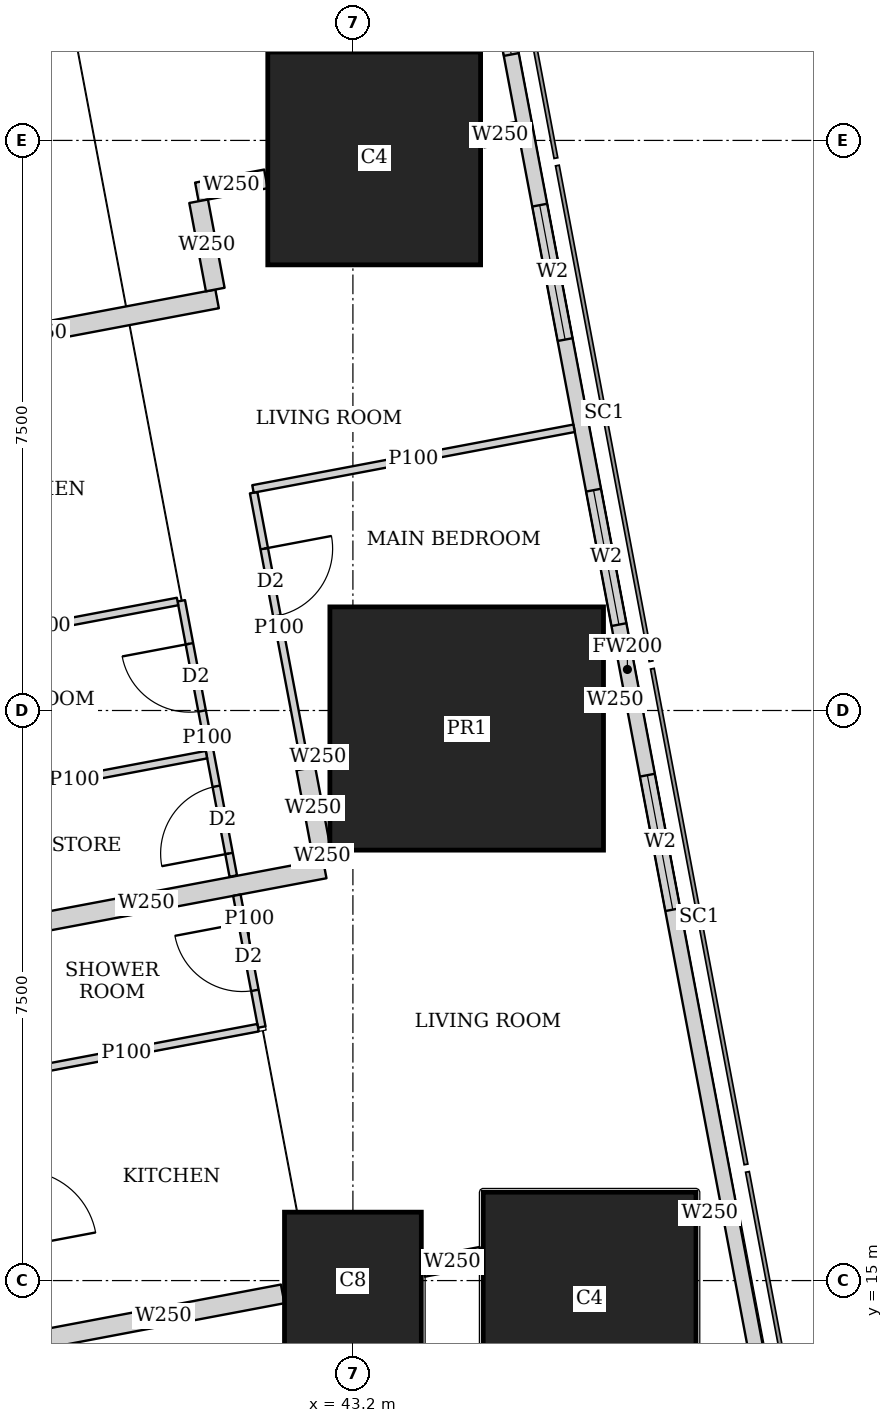
"""IFC4 building model, lengths in metres.
Left out: names, types, materials, properties, quantities, classifications, styles, units other than length and angle.
Written with IfcOpenShell. Run it as: python <this file> out.ifc"""

import sys

from ifc_helpers import new_model, si_unit, direction, frame, frame_2d, origin, origin_2d, place, context, subcontext, project, spatial, rectangle, extrude, element, fill, save


model = new_model("IFC4")
c1 = context("Model", 3, precision=1e-05, world=origin(), true_north=direction((0.0, 1.0)))
c2 = subcontext(c1, "Body", "Model", "MODEL_VIEW")
j1 = project(units=[si_unit("LENGTHUNIT", "METRE"), si_unit("PLANEANGLEUNIT", "RADIAN")], contexts=[c1])
p1 = place(None, origin())
s1 = spatial("IfcSite", under=j1, at=p1, CompositionType="ELEMENT")
p2 = place(p1, origin())
s2 = spatial("IfcBuilding", under=s1, at=p2, CompositionType="ELEMENT")
p3 = place(p2, frame((0.0, 0.0, 68.75)))
s3 = spatial("IfcBuildingStorey", under=s2, at=p3, CompositionType="ELEMENT", Elevation=68.75)
p4 = place(p3, frame((43.2, 15.0, 0.0), z_axis=(0.0, 0.0, 1.0), x_axis=(1.0, 0.0, 0.0)))
e1 = element("IfcColumn", 1, at=p4, inside=s3, PredefinedType="COLUMN", context=c2, shape_type="SweptSolid", body=[
    extrude(rectangle(XDim=1.8, YDim=1.8, at=origin_2d()), origin(), (0.0, 0.0, 1.0), 3.75),
])
p5 = place(p3, frame((46.314, 14.763, 0.0), z_axis=(0.0, 0.0, 1.0), x_axis=(1.0, 0.0, 0.0)))
e2 = element("IfcColumn", 2, at=p5, inside=s3, PredefinedType="COLUMN", context=c2, shape_type="SweptSolid", body=[
    extrude(rectangle(XDim=2.8, YDim=2.8, at=origin_2d()), origin(), (0.0, 0.0, 1.0), 3.75),
])
p6 = place(p3, frame((44.697, 22.263, 0.0), z_axis=(0.0, 0.0, 1.0), x_axis=(1.0, 0.0, 0.0)))
e3 = element("IfcColumn", 3, at=p6, inside=s3, PredefinedType="COLUMN", context=c2, shape_type="SweptSolid", body=[
    extrude(rectangle(XDim=3.6, YDim=3.2, at=origin_2d()), origin(), (0.0, 0.0, 1.0), 3.75),
])
p7 = place(p3, frame((43.48, 29.763, 0.0), z_axis=(0.0, 0.0, 1.0), x_axis=(1.0, 0.0, 0.0)))
e4 = element("IfcColumn", 4, at=p7, inside=s3, PredefinedType="COLUMN", context=c2, shape_type="SweptSolid", body=[
    extrude(rectangle(XDim=2.8, YDim=2.8, at=origin_2d()), origin(), (0.0, 0.0, 1.0), 3.75),
])
p8 = place(p3, frame((50.653, 2.703, 0.0), z_axis=(0.0, 0.0, 1.0), x_axis=(-0.185612026696, 0.982623109613, 0.0)))
e5 = element("IfcWall", 5, at=p8, inside=s3, PredefinedType="SOLIDWALL", context=c2, shape_type="SweptSolid", body=[
    extrude(rectangle(XDim=41.393, YDim=0.2, at=frame_2d((20.697, 0.0))), origin(), (0.0, 0.0, 1.0), 3.45),
])
p9 = place(p8, frame((1.633, 0.0, 0.9)))
e6 = element("IfcOpeningElement", 6, at=p9, cuts=e5, PredefinedType="OPENING", context=c2, shape_type="SweptSolid", body=[
    extrude(rectangle(XDim=1.8, YDim=1.5, at=frame_2d((0.9, 0.75))), frame((0.0, 0.11, 0.0), z_axis=(0.0, -1.0, 0.0), x_axis=(1.0, 0.0, 0.0)), (0.0, 0.0, 1.0), 0.22),
])
p10 = place(p8, frame((6.032, 0.0, 0.9)))
e7 = element("IfcOpeningElement", 7, at=p10, cuts=e5, PredefinedType="OPENING", context=c2, shape_type="SweptSolid", body=[
    extrude(rectangle(XDim=1.8, YDim=1.5, at=frame_2d((0.9, 0.75))), frame((0.0, 0.11, 0.0), z_axis=(0.0, -1.0, 0.0), x_axis=(1.0, 0.0, 0.0)), (0.0, 0.0, 1.0), 0.22),
])
p11 = place(p8, frame((9.848, 0.0, 0.9)))
e8 = element("IfcOpeningElement", 8, at=p11, cuts=e5, PredefinedType="OPENING", context=c2, shape_type="SweptSolid", body=[
    extrude(rectangle(XDim=1.8, YDim=1.5, at=frame_2d((0.9, 0.75))), frame((0.0, 0.11, 0.0), z_axis=(0.0, -1.0, 0.0), x_axis=(1.0, 0.0, 0.0)), (0.0, 0.0, 1.0), 0.22),
])
p12 = place(p8, frame((17.481, 0.0, 0.9)))
e9 = element("IfcOpeningElement", 9, at=p12, cuts=e5, PredefinedType="OPENING", context=c2, shape_type="SweptSolid", body=[
    extrude(rectangle(XDim=1.8, YDim=1.5, at=frame_2d((0.9, 0.75))), frame((0.0, 0.11, 0.0), z_axis=(0.0, -1.0, 0.0), x_axis=(1.0, 0.0, 0.0)), (0.0, 0.0, 1.0), 0.22),
])
p13 = place(p8, frame((21.297, 0.0, 0.9)))
e10 = element("IfcOpeningElement", 10, at=p13, cuts=e5, PredefinedType="OPENING", context=c2, shape_type="SweptSolid", body=[
    extrude(rectangle(XDim=1.8, YDim=1.5, at=frame_2d((0.9, 0.75))), frame((0.0, 0.11, 0.0), z_axis=(0.0, -1.0, 0.0), x_axis=(1.0, 0.0, 0.0)), (0.0, 0.0, 1.0), 0.22),
])
p14 = place(p8, frame((25.113, 0.0, 0.9)))
e11 = element("IfcOpeningElement", 11, at=p14, cuts=e5, PredefinedType="OPENING", context=c2, shape_type="SweptSolid", body=[
    extrude(rectangle(XDim=1.8, YDim=1.5, at=frame_2d((0.9, 0.75))), frame((0.0, 0.11, 0.0), z_axis=(0.0, -1.0, 0.0), x_axis=(1.0, 0.0, 0.0)), (0.0, 0.0, 1.0), 0.22),
])
p15 = place(p8, frame((28.93, 0.0, 0.9)))
e12 = element("IfcOpeningElement", 12, at=p15, cuts=e5, PredefinedType="OPENING", context=c2, shape_type="SweptSolid", body=[
    extrude(rectangle(XDim=1.8, YDim=1.5, at=frame_2d((0.9, 0.75))), frame((0.0, 0.11, 0.0), z_axis=(0.0, -1.0, 0.0), x_axis=(1.0, 0.0, 0.0)), (0.0, 0.0, 1.0), 0.22),
])
p16 = place(p8, frame((32.746, 0.0, 0.9)))
e13 = element("IfcOpeningElement", 13, at=p16, cuts=e5, PredefinedType="OPENING", context=c2, shape_type="SweptSolid", body=[
    extrude(rectangle(XDim=1.8, YDim=1.5, at=frame_2d((0.9, 0.75))), frame((0.0, 0.11, 0.0), z_axis=(0.0, -1.0, 0.0), x_axis=(1.0, 0.0, 0.0)), (0.0, 0.0, 1.0), 0.22),
])
p17 = place(p8, frame((36.481, 0.0, 0.9)))
e14 = element("IfcOpeningElement", 14, at=p17, cuts=e5, PredefinedType="OPENING", context=c2, shape_type="SweptSolid", body=[
    extrude(rectangle(XDim=1.8, YDim=1.5, at=frame_2d((0.9, 0.75))), frame((0.0, 0.11, 0.0), z_axis=(0.0, -1.0, 0.0), x_axis=(1.0, 0.0, 0.0)), (0.0, 0.0, 1.0), 0.22),
])
p18 = place(p3, frame((33.68, 42.723, 0.0), z_axis=(0.0, 0.0, 1.0), x_axis=(0.185624129307, -0.98262082342, 0.0)))
e15 = element("IfcWall", 15, at=p18, inside=s3, PredefinedType="SOLIDWALL", context=c2, shape_type="SweptSolid", body=[
    extrude(rectangle(XDim=41.051, YDim=0.15, at=frame_2d((20.526, 0.0))), origin(), (0.0, 0.0, 1.0), 2.45),
])
p19 = place(p18, frame((13.577, 0.0, 0.0)))
e16 = element("IfcOpeningElement", 16, at=p19, cuts=e15, PredefinedType="OPENING", context=c2, shape_type="SweptSolid", body=[
    extrude(rectangle(XDim=1.0, YDim=2.1, at=frame_2d((0.5, 1.05))), frame((0.0, 0.085, 0.0), z_axis=(0.0, -1.0, 0.0), x_axis=(1.0, 0.0, 0.0)), (0.0, 0.0, 1.0), 0.17),
])
p20 = place(p18, frame((17.394, 0.0, 0.0)))
e17 = element("IfcOpeningElement", 17, at=p20, cuts=e15, PredefinedType="OPENING", context=c2, shape_type="SweptSolid", body=[
    extrude(rectangle(XDim=1.0, YDim=2.1, at=frame_2d((0.5, 1.05))), frame((0.0, 0.085, 0.0), z_axis=(0.0, -1.0, 0.0), x_axis=(1.0, 0.0, 0.0)), (0.0, 0.0, 1.0), 0.17),
])
p21 = place(p18, frame((26.758, 0.0, 0.0)))
e18 = element("IfcOpeningElement", 18, at=p21, cuts=e15, PredefinedType="OPENING", context=c2, shape_type="SweptSolid", body=[
    extrude(rectangle(XDim=1.0, YDim=2.1, at=frame_2d((0.5, 1.05))), frame((0.0, 0.085, 0.0), z_axis=(0.0, -1.0, 0.0), x_axis=(1.0, 0.0, 0.0)), (0.0, 0.0, 1.0), 0.17),
])
p22 = place(p18, frame((32.193, 0.0, 0.0)))
e19 = element("IfcOpeningElement", 19, at=p22, cuts=e15, PredefinedType="OPENING", context=c2, shape_type="SweptSolid", body=[
    extrude(rectangle(XDim=1.0, YDim=2.1, at=frame_2d((0.5, 1.05))), frame((0.0, 0.085, 0.0), z_axis=(0.0, -1.0, 0.0), x_axis=(1.0, 0.0, 0.0)), (0.0, 0.0, 1.0), 0.17),
])
p23 = place(p3, frame((39.525, 31.443, 0.0), z_axis=(0.0, 0.0, 1.0), x_axis=(-0.982648035033, -0.185480023848, 0.0)))
e20 = element("IfcWall", 20, at=p23, inside=s3, PredefinedType="PARTITIONING", context=c2, shape_type="SweptSolid", body=[
    extrude(rectangle(XDim=3.575, YDim=0.1, at=frame_2d((1.788, 0.0))), origin(), (0.0, 0.0, 1.0), 3.45),
])
p24 = place(p3, frame((41.894, 25.366, 0.0), z_axis=(0.0, 0.0, 1.0), x_axis=(0.185611839851, -0.982623144907, 0.0)))
e21 = element("IfcWall", 21, at=p24, inside=s3, PredefinedType="PARTITIONING", context=c2, shape_type="SweptSolid", body=[
    extrude(rectangle(XDim=3.62, YDim=0.1, at=frame_2d((1.81, 0.0))), origin(), (0.0, 0.0, 1.0), 2.45),
])
p25 = place(p24, frame((0.75, 0.0, 0.0)))
e22 = element("IfcOpeningElement", 22, at=p25, cuts=e21, PredefinedType="OPENING", context=c2, shape_type="SweptSolid", body=[
    extrude(rectangle(XDim=0.9, YDim=2.1, at=frame_2d((0.45, 1.05))), frame((0.0, 0.06, 0.0), z_axis=(0.0, -1.0, 0.0), x_axis=(1.0, 0.0, 0.0)), (0.0, 0.0, 1.0), 0.12),
])
p26 = place(p3, frame((40.942, 23.943, 0.0), z_axis=(0.0, 0.0, 1.0), x_axis=(0.185632361754, -0.982619268216, 0.0)))
e23 = element("IfcWall", 23, at=p26, inside=s3, PredefinedType="PARTITIONING", context=c2, shape_type="SweptSolid", body=[
    extrude(rectangle(XDim=3.685, YDim=0.1, at=frame_2d((1.843, 0.0))), origin(), (0.0, 0.0, 1.0), 2.45),
])
p27 = place(p26, frame((0.575, 0.0, 0.0)))
e24 = element("IfcOpeningElement", 24, at=p27, cuts=e23, PredefinedType="OPENING", context=c2, shape_type="SweptSolid", body=[
    extrude(rectangle(XDim=0.9, YDim=2.1, at=frame_2d((0.45, 1.05))), frame((0.0, 0.06, 0.0), z_axis=(0.0, -1.0, 0.0), x_axis=(1.0, 0.0, 0.0)), (0.0, 0.0, 1.0), 0.12),
])
p28 = place(p26, frame((2.483, 0.0, 0.0)))
e25 = element("IfcOpeningElement", 25, at=p28, cuts=e23, PredefinedType="OPENING", context=c2, shape_type="SweptSolid", body=[
    extrude(rectangle(XDim=0.9, YDim=2.1, at=frame_2d((0.45, 1.05))), frame((0.0, 0.06, 0.0), z_axis=(0.0, -1.0, 0.0), x_axis=(1.0, 0.0, 0.0)), (0.0, 0.0, 1.0), 0.12),
])
p29 = place(p3, frame((46.11, 26.213, 0.0), z_axis=(0.0, 0.0, 1.0), x_axis=(-0.982633535512, -0.185556823879, 0.0)))
e26 = element("IfcWall", 26, at=p29, inside=s3, PredefinedType="PARTITIONING", context=c2, shape_type="SweptSolid", body=[
    extrude(rectangle(XDim=4.3, YDim=0.1, at=frame_2d((2.15, 0.0))), origin(), (0.0, 0.0, 1.0), 2.0),
])
p30 = place(p3, frame((40.893, 23.934, 0.0), z_axis=(0.0, 0.0, 1.0), x_axis=(-0.982588017646, -0.185797706064, 0.0)))
e27 = element("IfcWall", 27, at=p30, inside=s3, PredefinedType="PARTITIONING", context=c2, shape_type="SweptSolid", body=[
    extrude(rectangle(XDim=3.525, YDim=0.1, at=frame_2d((1.763, 0.0))), origin(), (0.0, 0.0, 1.0), 3.45),
])
p31 = place(p3, frame((41.273, 21.919, 0.0), z_axis=(0.0, 0.0, 1.0), x_axis=(-0.982636169624, -0.185542874149, 0.0)))
e28 = element("IfcWall", 28, at=p31, inside=s3, PredefinedType="PARTITIONING", context=c2, shape_type="SweptSolid", body=[
    extrude(rectangle(XDim=3.525, YDim=0.1, at=frame_2d((1.763, 0.0))), origin(), (0.0, 0.0, 1.0), 2.45),
])
p32 = place(p3, frame((45.372, 30.121, 0.0), z_axis=(0.0, 0.0, 1.0), x_axis=(-0.982352019699, -0.187041464366, 0.0)))
e29 = element("IfcWall", 29, at=p32, inside=s3, PredefinedType="SOLIDWALL", context=c2, shape_type="SweptSolid", body=[
    extrude(rectangle(XDim=0.476, YDim=0.25, at=frame_2d((0.238, 0.0))), origin(), (0.0, 0.0, 1.0), 3.45),
])
p33 = place(p3, frame((42.056, 29.494, 0.0), z_axis=(0.0, 0.0, 1.0), x_axis=(-0.982587178881, -0.185802141803, 0.0)))
e30 = element("IfcWall", 30, at=p33, inside=s3, PredefinedType="SOLIDWALL", context=c2, shape_type="SweptSolid", body=[
    extrude(rectangle(XDim=0.925, YDim=0.25, at=frame_2d((0.462, 0.0))), origin(), (0.0, 0.0, 1.0), 2.45),
])
p34 = place(p3, frame((41.413, 27.915, 0.0), z_axis=(0.0, 0.0, 1.0), x_axis=(-0.982635807605, -0.185544791394, 0.0)))
e31 = element("IfcWall", 31, at=p34, inside=s3, PredefinedType="SOLIDWALL", context=c2, shape_type="SweptSolid", body=[
    extrude(rectangle(XDim=4.775, YDim=0.25, at=frame_2d((2.388, 0.0))), origin(), (0.0, 0.0, 1.0), 3.45),
])
p35 = place(p3, frame((41.17, 29.2, 0.0), z_axis=(0.0, 0.0, 1.0), x_axis=(0.185223510709, -0.982696418575, 0.0)))
e32 = element("IfcWall", 32, at=p35, inside=s3, PredefinedType="SOLIDWALL", context=c2, shape_type="SweptSolid", body=[
    extrude(rectangle(XDim=1.182, YDim=0.25, at=frame_2d((0.591, 0.0))), origin(), (0.0, 0.0, 1.0), 2.45),
])
p36 = place(p3, frame((41.673, 20.07, 0.0), z_axis=(0.0, 0.0, 1.0), x_axis=(0.185783379659, -0.98259072652, 0.0)))
e33 = element("IfcWall", 33, at=p36, inside=s3, PredefinedType="PARTITIONING", context=c2, shape_type="SweptSolid", body=[
    extrude(rectangle(XDim=1.765, YDim=0.1, at=frame_2d((0.882, 0.0))), origin(), (0.0, 0.0, 1.0), 3.45),
])
p37 = place(p36, frame((0.374, 0.0, 0.0)))
e34 = element("IfcOpeningElement", 34, at=p37, cuts=e33, PredefinedType="OPENING", context=c2, shape_type="SweptSolid", body=[
    extrude(rectangle(XDim=0.9, YDim=2.1, at=frame_2d((0.45, 1.05))), frame((0.0, 0.06, 0.0), z_axis=(0.0, -1.0, 0.0), x_axis=(1.0, 0.0, 0.0)), (0.0, 0.0, 1.0), 0.12),
])
p38 = place(p3, frame((41.952, 18.327, 0.0), z_axis=(0.0, 0.0, 1.0), x_axis=(-0.982648794755, -0.185475998897, 0.0)))
e35 = element("IfcWall", 35, at=p38, inside=s3, PredefinedType="PARTITIONING", context=c2, shape_type="SweptSolid", body=[
    extrude(rectangle(XDim=3.525, YDim=0.1, at=frame_2d((1.763, 0.0))), origin(), (0.0, 0.0, 1.0), 3.45),
])
p39 = place(p3, frame((46.782, 22.657, 0.0), z_axis=(0.0, 0.0, 1.0), x_axis=(-0.982778390997, -0.18478807913, 0.0)))
e36 = element("IfcWall", 36, at=p39, inside=s3, PredefinedType="SOLIDWALL", context=c2, shape_type="SweptSolid", body=[
    extrude(rectangle(XDim=0.266, YDim=0.25, at=frame_2d((0.133, 0.0))), origin(), (0.0, 0.0, 1.0), 3.45),
])
p40 = place(p3, frame((42.873, 21.918, 0.0), z_axis=(0.0, 0.0, 1.0), x_axis=(-0.982892522967, -0.184180043152, 0.0)))
e37 = element("IfcWall", 37, at=p40, inside=s3, PredefinedType="SOLIDWALL", context=c2, shape_type="SweptSolid", body=[
    extrude(rectangle(XDim=0.272, YDim=0.25, at=frame_2d((0.136, 0.0))), origin(), (0.0, 0.0, 1.0), 2.45),
])
p41 = place(p3, frame((42.829, 20.416, 0.0), z_axis=(0.0, 0.0, 1.0), x_axis=(-0.982635807605, -0.185544791394, 0.0)))
e38 = element("IfcWall", 38, at=p41, inside=s3, PredefinedType="SOLIDWALL", context=c2, shape_type="SweptSolid", body=[
    extrude(rectangle(XDim=4.775, YDim=0.25, at=frame_2d((2.388, 0.0))), origin(), (0.0, 0.0, 1.0), 3.45),
])
p42 = place(p3, frame((42.58, 21.736, 0.0), z_axis=(0.0, 0.0, 1.0), x_axis=(0.185458925981, -0.982652017132, 0.0)))
e39 = element("IfcWall", 39, at=p42, inside=s3, PredefinedType="SOLIDWALL", context=c2, shape_type="SweptSolid", body=[
    extrude(rectangle(XDim=1.045, YDim=0.25, at=frame_2d((0.522, 0.0))), origin(), (0.0, 0.0, 1.0), 2.45),
])
p43 = place(p3, frame((42.787, 20.639, 0.0), z_axis=(0.0, 0.0, 1.0), x_axis=(0.185013851593, -0.982735913009, 0.0)))
e40 = element("IfcWall", 40, at=p43, inside=s3, PredefinedType="SOLIDWALL", context=c2, shape_type="SweptSolid", body=[
    extrude(rectangle(XDim=0.102, YDim=0.25, at=frame_2d((0.051, 0.0))), origin(), (0.0, 0.0, 1.0), 3.45),
])
p44 = place(p3, frame((48.055, 15.917, 0.0), z_axis=(0.0, 0.0, 1.0), x_axis=(-0.982510408223, -0.186207673669, 0.0)))
e41 = element("IfcWall", 41, at=p44, inside=s3, PredefinedType="SOLIDWALL", context=c2, shape_type="SweptSolid", body=[
    extrude(rectangle(XDim=0.323, YDim=0.25, at=frame_2d((0.161, 0.0))), origin(), (0.0, 0.0, 1.0), 3.45),
])
p45 = place(p3, frame((44.89, 15.319, 0.0), z_axis=(0.0, 0.0, 1.0), x_axis=(-0.982540856152, -0.186046945666, 0.0)))
e42 = element("IfcWall", 42, at=p45, inside=s3, PredefinedType="SOLIDWALL", context=c2, shape_type="SweptSolid", body=[
    extrude(rectangle(XDim=0.78, YDim=0.25, at=frame_2d((0.39, 0.0))), origin(), (0.0, 0.0, 1.0), 2.0),
])
p46 = place(p3, frame((42.276, 14.825, 0.0), z_axis=(0.0, 0.0, 1.0), x_axis=(-0.982607211054, -0.185696173318, 0.0)))
e43 = element("IfcWall", 43, at=p46, inside=s3, PredefinedType="SOLIDWALL", context=c2, shape_type="SweptSolid", body=[
    extrude(rectangle(XDim=3.194, YDim=0.25, at=frame_2d((1.597, 0.0))), origin(), (0.0, 0.0, 1.0), 3.45),
])
p47 = place(p12, origin())
e44 = element("IfcWindow", 44, at=p47, inside=s3, PartitioningType="SINGLE_PANEL", PredefinedType="WINDOW", context=c2, shape_type="SweptSolid", body=[
    extrude(rectangle(XDim=1.8, YDim=1.5, at=frame_2d((0.9, 0.75))), frame((0.0, 0.03, 0.0), z_axis=(0.0, -1.0, 0.0), x_axis=(1.0, 0.0, 0.0)), (0.0, 0.0, 1.0), 0.06),
])
fill(e9, e44)
p48 = place(p13, origin())
e45 = element("IfcWindow", 45, at=p48, inside=s3, PartitioningType="SINGLE_PANEL", PredefinedType="WINDOW", context=c2, shape_type="SweptSolid", body=[
    extrude(rectangle(XDim=1.8, YDim=1.5, at=frame_2d((0.9, 0.75))), frame((0.0, 0.03, 0.0), z_axis=(0.0, -1.0, 0.0), x_axis=(1.0, 0.0, 0.0)), (0.0, 0.0, 1.0), 0.06),
])
fill(e10, e45)
p49 = place(p14, origin())
e46 = element("IfcWindow", 46, at=p49, inside=s3, PartitioningType="SINGLE_PANEL", PredefinedType="WINDOW", context=c2, shape_type="SweptSolid", body=[
    extrude(rectangle(XDim=1.8, YDim=1.5, at=frame_2d((0.9, 0.75))), frame((0.0, 0.03, 0.0), z_axis=(0.0, -1.0, 0.0), x_axis=(1.0, 0.0, 0.0)), (0.0, 0.0, 1.0), 0.06),
])
fill(e11, e46)
p50 = place(p15, origin())
e47 = element("IfcWindow", 47, at=p50, inside=s3, PartitioningType="SINGLE_PANEL", PredefinedType="WINDOW", context=c2, shape_type="SweptSolid", body=[
    extrude(rectangle(XDim=1.8, YDim=1.5, at=frame_2d((0.9, 0.75))), frame((0.0, 0.03, 0.0), z_axis=(0.0, -1.0, 0.0), x_axis=(1.0, 0.0, 0.0)), (0.0, 0.0, 1.0), 0.06),
])
fill(e12, e47)
p51 = place(p25, origin())
e48 = element("IfcDoor", 48, at=p51, inside=s3, OperationType="SINGLE_SWING_LEFT", PredefinedType="DOOR", context=c2, shape_type="SweptSolid", body=[
    extrude(rectangle(XDim=0.9, YDim=2.1, at=frame_2d((0.45, 1.05))), frame((0.0, 0.025, 0.0), z_axis=(0.0, -1.0, 0.0), x_axis=(1.0, 0.0, 0.0)), (0.0, 0.0, 1.0), 0.05),
])
fill(e22, e48)
p52 = place(p27, origin())
e49 = element("IfcDoor", 49, at=p52, inside=s3, OperationType="SINGLE_SWING_RIGHT", PredefinedType="DOOR", context=c2, shape_type="SweptSolid", body=[
    extrude(rectangle(XDim=0.9, YDim=2.1, at=frame_2d((0.45, 1.05))), frame((0.0, 0.025, 0.0), z_axis=(0.0, -1.0, 0.0), x_axis=(1.0, 0.0, 0.0)), (0.0, 0.0, 1.0), 0.05),
])
fill(e24, e49)
p53 = place(p28, origin())
e50 = element("IfcDoor", 50, at=p53, inside=s3, OperationType="SINGLE_SWING_LEFT", PredefinedType="DOOR", context=c2, shape_type="SweptSolid", body=[
    extrude(rectangle(XDim=0.9, YDim=2.1, at=frame_2d((0.45, 1.05))), frame((0.0, 0.025, 0.0), z_axis=(0.0, -1.0, 0.0), x_axis=(1.0, 0.0, 0.0)), (0.0, 0.0, 1.0), 0.05),
])
fill(e25, e50)
p54 = place(p37, origin())
e51 = element("IfcDoor", 51, at=p54, inside=s3, OperationType="SINGLE_SWING_RIGHT", PredefinedType="DOOR", context=c2, shape_type="SweptSolid", body=[
    extrude(rectangle(XDim=0.9, YDim=2.1, at=frame_2d((0.45, 1.05))), frame((0.0, 0.025, 0.0), z_axis=(0.0, -1.0, 0.0), x_axis=(1.0, 0.0, 0.0)), (0.0, 0.0, 1.0), 0.05),
])
fill(e34, e51)
save(model, sys.argv[1])
